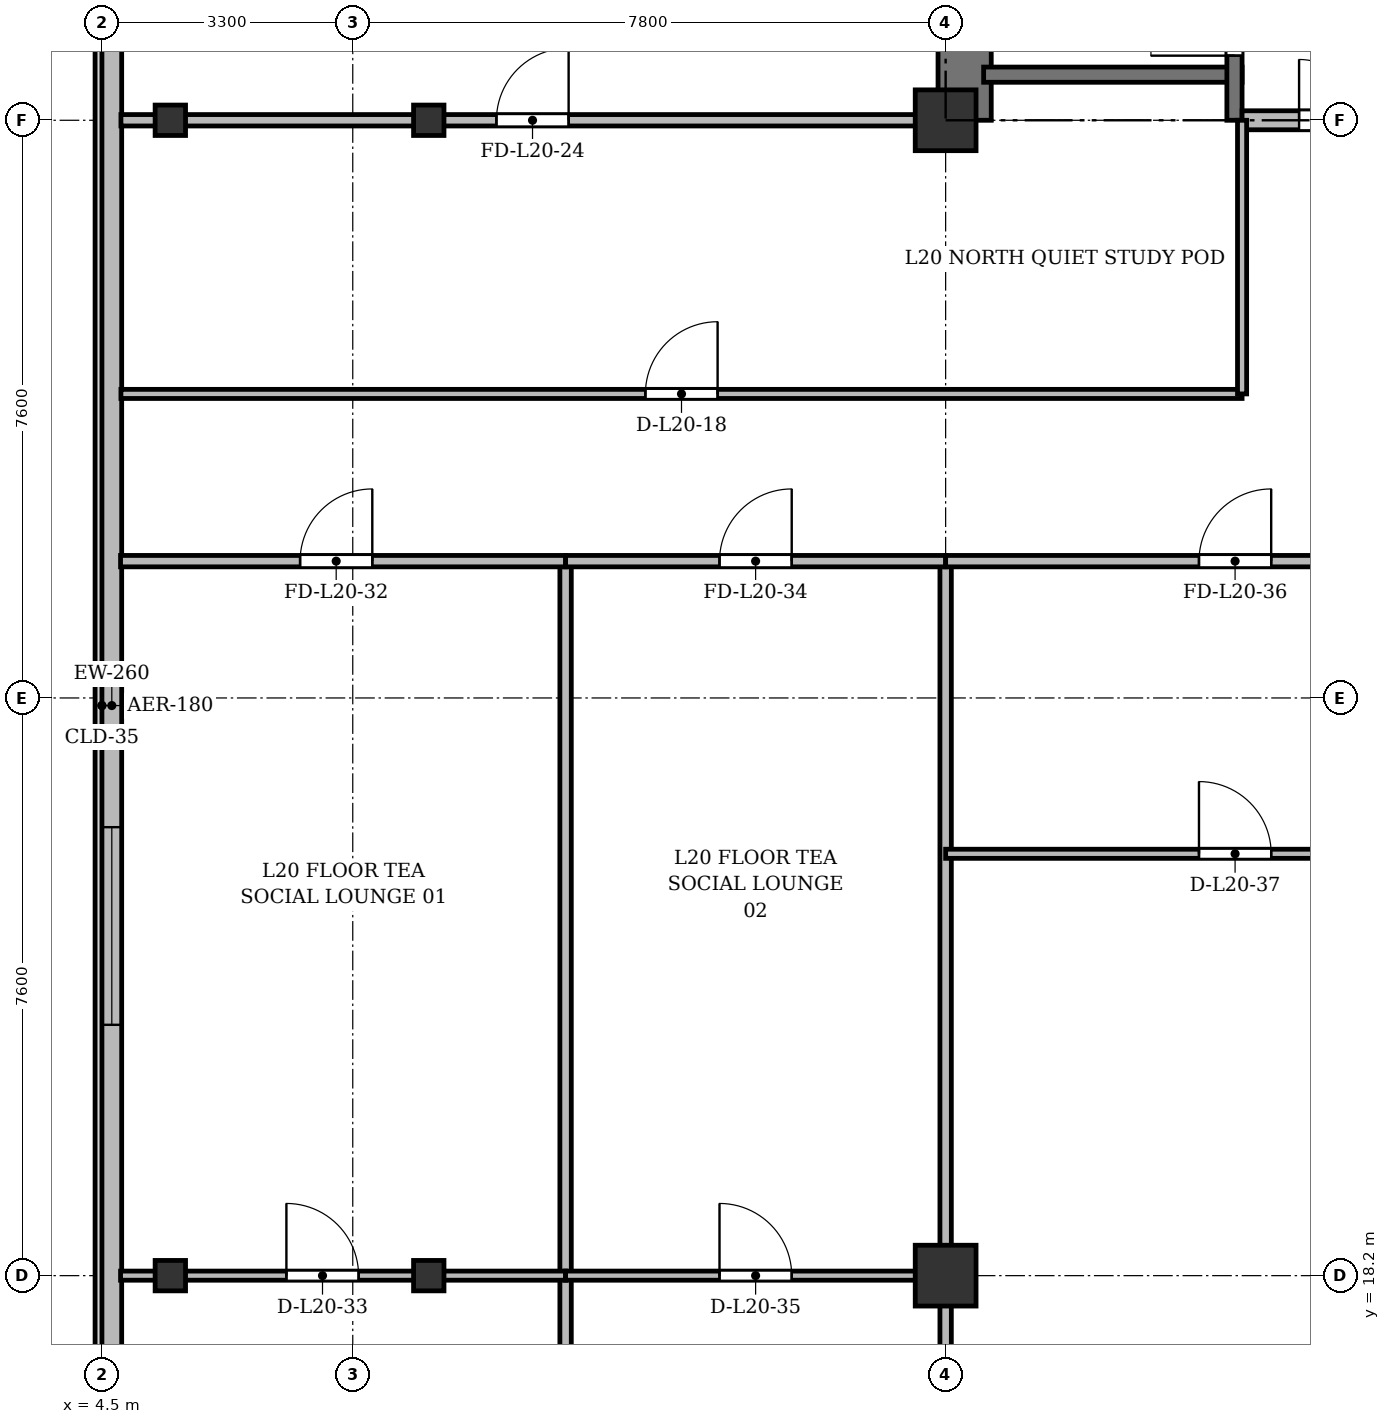
"""IFC4 building model, lengths in metres.
Left out: names, types, materials, properties, quantities, classifications, styles, units other than length and angle.
Written with IfcOpenShell. Run it as: python <this file> out.ifc"""

import sys

from ifc_helpers import new_model, si_unit, direction, frame, frame_2d, origin, origin_2d, place, context, subcontext, project, spatial, rectangle, i_section, extrude, source, transform, mapped, element, fill, save


model = new_model("IFC4")
c1 = context("Model", 3, precision=1e-05, world=origin(), true_north=direction((0.0, 1.0)))
c2 = subcontext(c1, "Body", "Model", "MODEL_VIEW")
j1 = project(units=[si_unit("LENGTHUNIT", "METRE"), si_unit("PLANEANGLEUNIT", "RADIAN")], contexts=[c1])
p1 = place(None, origin())
s1 = spatial("IfcSite", under=j1, at=p1, CompositionType="ELEMENT")
p2 = place(p1, origin())
s2 = spatial("IfcBuilding", under=s1, at=p2, CompositionType="ELEMENT")
p3 = place(p2, frame((0.0, 0.0, 81.7)))
s3 = spatial("IfcBuildingStorey", under=s2, at=p3, CompositionType="ELEMENT", Elevation=81.7)
m1 = source(origin(), c2, "Body", "SweptSolid", [
    extrude(i_section(OverallWidth=0.4, OverallDepth=0.4, WebThickness=0.022, FlangeThickness=0.035, at=origin_2d()), origin(), (0.0, 0.0, 1.0), 3.6),
])
for number, where, z_axis, x_axis in (
    (1, (5.4, 18.2, 0.0), (0.0, 0.0, 1.0), (1.0, 0.0, 0.0)),
    (2, (5.4, 33.4, 0.0), (0.0, 0.0, 1.0), (1.0, 0.0, 0.0)),
    (3, (8.8, 18.2, 0.0), (0.0, 0.0, 1.0), (1.0, 0.0, 0.0)),
    (4, (8.8, 33.4, 0.0), (0.0, 0.0, 1.0), (1.0, 0.0, 0.0)),
):
    element("IfcColumn", number, at=place(p3, frame(where, z_axis=z_axis, x_axis=x_axis)), inside=s3, PredefinedType="COLUMN", context=c2, shape_type="MappedRepresentation", body=[
        mapped(m1, transform((0.0, 0.0, 0.0), x_axis=(1.0, 0.0, 0.0), y_axis=(0.0, 1.0, 0.0), z_axis=(0.0, 0.0, 1.0), scale=1.0)),
    ])
m2 = source(origin(), c2, "Body", "SweptSolid", [
    extrude(rectangle(XDim=0.8, YDim=0.8, at=origin_2d()), origin(), (0.0, 0.0, 1.0), 3.6),
])
for number, where, z_axis, x_axis in (
    (5, (15.6, 18.2, 0.0), (0.0, 0.0, 1.0), (1.0, 0.0, 0.0)),
    (6, (15.6, 33.4, 0.0), (0.0, 0.0, 1.0), (1.0, 0.0, 0.0)),
):
    element("IfcColumn", number, at=place(p3, frame(where, z_axis=z_axis, x_axis=x_axis)), inside=s3, PredefinedType="COLUMN", context=c2, shape_type="MappedRepresentation", body=[
        mapped(m2, transform((0.0, 0.0, 0.0), x_axis=(1.0, 0.0, 0.0), y_axis=(0.0, 1.0, 0.0), z_axis=(0.0, 0.0, 1.0), scale=1.0)),
    ])
p4 = place(p3, frame((4.63, 5.9, 0.0), z_axis=(0.0, 0.0, 1.0), x_axis=(0.0, 1.0, 0.0)))
e7 = element("IfcWall", 7, at=p4, inside=s3, PredefinedType="SOLIDWALL", context=c2, shape_type="SweptSolid", body=[
    extrude(rectangle(XDim=39.6, YDim=0.26, at=frame_2d((19.8, 0.0))), origin(), (0.0, 0.0, 1.0), 3.34),
])
p5 = place(p4, frame((1.45, 0.0, 0.92)))
e8 = element("IfcOpeningElement", 8, at=p5, cuts=e7, PredefinedType="OPENING", context=c2, shape_type="SweptSolid", body=[
    extrude(rectangle(XDim=1.2, YDim=1.65, at=frame_2d((0.6, 0.825))), frame((0.0, 0.14, 0.0), z_axis=(0.0, -1.0, 0.0), x_axis=(1.0, 0.0, 0.0)), (0.0, 0.0, 1.0), 0.28),
])
p6 = place(p4, frame((4.2, 0.0, 0.92)))
e9 = element("IfcOpeningElement", 9, at=p6, cuts=e7, PredefinedType="OPENING", context=c2, shape_type="SweptSolid", body=[
    extrude(rectangle(XDim=2.6, YDim=1.9, at=frame_2d((1.3, 0.95))), frame((0.0, 0.14, 0.0), z_axis=(0.0, -1.0, 0.0), x_axis=(1.0, 0.0, 0.0)), (0.0, 0.0, 1.0), 0.28),
])
p7 = place(p4, frame((8.4, 0.0, 0.92)))
e10 = element("IfcOpeningElement", 10, at=p7, cuts=e7, PredefinedType="OPENING", context=c2, shape_type="SweptSolid", body=[
    extrude(rectangle(XDim=2.6, YDim=1.9, at=frame_2d((1.3, 0.95))), frame((0.0, 0.14, 0.0), z_axis=(0.0, -1.0, 0.0), x_axis=(1.0, 0.0, 0.0)), (0.0, 0.0, 1.0), 0.28),
])
p8 = place(p4, frame((15.6, 0.0, 0.92)))
e11 = element("IfcOpeningElement", 11, at=p8, cuts=e7, PredefinedType="OPENING", context=c2, shape_type="SweptSolid", body=[
    extrude(rectangle(XDim=2.6, YDim=1.9, at=frame_2d((1.3, 0.95))), frame((0.0, 0.14, 0.0), z_axis=(0.0, -1.0, 0.0), x_axis=(1.0, 0.0, 0.0)), (0.0, 0.0, 1.0), 0.28),
])
p9 = place(p4, frame((29.6, 0.0, 0.92)))
e12 = element("IfcOpeningElement", 12, at=p9, cuts=e7, PredefinedType="OPENING", context=c2, shape_type="SweptSolid", body=[
    extrude(rectangle(XDim=2.6, YDim=1.9, at=frame_2d((1.3, 0.95))), frame((0.0, 0.14, 0.0), z_axis=(0.0, -1.0, 0.0), x_axis=(1.0, 0.0, 0.0)), (0.0, 0.0, 1.0), 0.28),
])
p10 = place(p4, frame((37.25, 0.0, 0.92)))
e13 = element("IfcOpeningElement", 13, at=p10, cuts=e7, PredefinedType="OPENING", context=c2, shape_type="SweptSolid", body=[
    extrude(rectangle(XDim=1.2, YDim=1.65, at=frame_2d((0.6, 0.825))), frame((0.0, 0.14, 0.0), z_axis=(0.0, -1.0, 0.0), x_axis=(1.0, 0.0, 0.0)), (0.0, 0.0, 1.0), 0.28),
])
p11 = place(p3, frame((15.85, 33.4, 0.0), z_axis=(0.0, 0.0, 1.0), x_axis=(0.0, 1.0, 0.0)))
e14 = element("IfcWall", 14, at=p11, inside=s3, PredefinedType="SHEAR", context=c2, shape_type="SweptSolid", body=[
    extrude(rectangle(XDim=11.7, YDim=0.7, at=frame_2d((5.85, 0.0))), origin(), (0.0, 0.0, 1.0), 3.34),
])
p12 = place(p3, frame((16.1, 34.0, 0.0), z_axis=(0.0, 0.0, 1.0), x_axis=(1.0, 0.0, 0.0)))
e15 = element("IfcWall", 15, at=p12, inside=s3, PredefinedType="SHEAR", context=c2, shape_type="SweptSolid", body=[
    extrude(rectangle(XDim=3.4, YDim=0.2, at=frame_2d((1.7, 0.0))), origin(), (0.0, 0.0, 1.0), 3.34),
])
p13 = place(p3, frame((19.4, 33.4, 0.0), z_axis=(0.0, 0.0, 1.0), x_axis=(0.0, 1.0, 0.0)))
e16 = element("IfcWall", 16, at=p13, inside=s3, PredefinedType="SHEAR", context=c2, shape_type="SweptSolid", body=[
    extrude(rectangle(XDim=11.1, YDim=0.2, at=frame_2d((5.55, 0.0))), origin(), (0.0, 0.0, 1.0), 3.34),
])
p14 = place(p13, frame((0.85, 0.0, 0.0)))
e17 = element("IfcOpeningElement", 17, at=p14, cuts=e16, PredefinedType="OPENING", context=c2, shape_type="SweptSolid", body=[
    extrude(rectangle(XDim=1.1, YDim=2.15, at=frame_2d((0.55, 1.075))), frame((0.0, 0.11, 0.0), z_axis=(0.0, -1.0, 0.0), x_axis=(1.0, 0.0, 0.0)), (0.0, 0.0, 1.0), 0.22),
])
p15 = place(p3, frame((19.5, 33.4, 0.0), z_axis=(0.0, 0.0, 1.0), x_axis=(1.0, 0.0, 0.0)))
e18 = element("IfcWall", 18, at=p15, inside=s3, PredefinedType="PARTITIONING", context=c2, shape_type="SweptSolid", body=[
    extrude(rectangle(XDim=6.8, YDim=0.25, at=frame_2d((3.4, 0.0))), origin(), (0.0, 0.0, 1.0), 2.752),
])
p16 = place(p15, frame((0.75, 0.0, 0.0)))
e19 = element("IfcOpeningElement", 19, at=p16, cuts=e18, PredefinedType="OPENING", context=c2, shape_type="SweptSolid", body=[
    extrude(rectangle(XDim=1.6, YDim=2.2, at=frame_2d((0.8, 1.1))), frame((0.0, 0.135, 0.0), z_axis=(0.0, -1.0, 0.0), x_axis=(1.0, 0.0, 0.0)), (0.0, 0.0, 1.0), 0.27),
])
p17 = place(p3, frame((4.75, 29.8, 0.0), z_axis=(0.0, 0.0, 1.0), x_axis=(1.0, 0.0, 0.0)))
e20 = element("IfcWall", 20, at=p17, inside=s3, PredefinedType="PARTITIONING", context=c2, shape_type="SweptSolid", body=[
    extrude(rectangle(XDim=14.75, YDim=0.12, at=frame_2d((7.375, 0.0))), origin(), (0.0, 0.0, 1.0), 2.84),
])
p18 = place(p17, frame((6.9, 0.0, 0.0)))
e21 = element("IfcOpeningElement", 21, at=p18, cuts=e20, PredefinedType="OPENING", context=c2, shape_type="SweptSolid", body=[
    extrude(rectangle(XDim=0.95, YDim=2.15, at=frame_2d((0.475, 1.075))), frame((0.0, 0.07, 0.0), z_axis=(0.0, -1.0, 0.0), x_axis=(1.0, 0.0, 0.0)), (0.0, 0.0, 1.0), 0.14),
])
p19 = place(p3, frame((19.5, 29.8, 0.0), z_axis=(0.0, 0.0, 1.0), x_axis=(0.0, 1.0, 0.0)))
e22 = element("IfcWall", 22, at=p19, inside=s3, PredefinedType="PARTITIONING", context=c2, shape_type="SweptSolid", body=[
    extrude(rectangle(XDim=3.6, YDim=0.12, at=frame_2d((1.8, 0.0))), origin(), (0.0, 0.0, 1.0), 2.752),
])
p20 = place(p3, frame((4.75, 33.4, 0.0), z_axis=(0.0, 0.0, 1.0), x_axis=(1.0, 0.0, 0.0)))
e23 = element("IfcWall", 23, at=p20, inside=s3, PredefinedType="PARTITIONING", context=c2, shape_type="SweptSolid", body=[
    extrude(rectangle(XDim=10.85, YDim=0.15, at=frame_2d((5.425, 0.0))), origin(), (0.0, 0.0, 1.0), 2.752),
])
p21 = place(p20, frame((4.94, 0.0, 0.0)))
e24 = element("IfcOpeningElement", 24, at=p21, cuts=e23, PredefinedType="OPENING", context=c2, shape_type="SweptSolid", body=[
    extrude(rectangle(XDim=0.95, YDim=2.15, at=frame_2d((0.475, 1.075))), frame((0.0, 0.085, 0.0), z_axis=(0.0, -1.0, 0.0), x_axis=(1.0, 0.0, 0.0)), (0.0, 0.0, 1.0), 0.17),
])
p22 = place(p3, frame((10.6, 3.145, 0.0), z_axis=(0.0, 0.0, 1.0), x_axis=(0.0, 1.0, 0.0)))
e25 = element("IfcWall", 25, at=p22, inside=s3, PredefinedType="PARTITIONING", context=c2, shape_type="SweptSolid", body=[
    extrude(rectangle(XDim=24.455, YDim=0.15, at=frame_2d((12.228, 0.0))), origin(), (0.0, 0.0, 1.0), 2.752),
])
p23 = place(p3, frame((15.6, 3.145, 0.0), z_axis=(0.0, 0.0, 1.0), x_axis=(0.0, 1.0, 0.0)))
e26 = element("IfcWall", 26, at=p23, inside=s3, PredefinedType="PARTITIONING", context=c2, shape_type="SweptSolid", body=[
    extrude(rectangle(XDim=24.455, YDim=0.15, at=frame_2d((12.228, 0.0))), origin(), (0.0, 0.0, 1.0), 2.84),
])
p24 = place(p3, frame((4.745, 27.6, 0.0), z_axis=(0.0, 0.0, 1.0), x_axis=(1.0, 0.0, 0.0)))
e27 = element("IfcWall", 27, at=p24, inside=s3, PredefinedType="PARTITIONING", context=c2, shape_type="SweptSolid", body=[
    extrude(rectangle(XDim=5.855, YDim=0.15, at=frame_2d((2.927, 0.0))), origin(), (0.0, 0.0, 1.0), 2.84),
])
p25 = place(p24, frame((2.362, 0.0, 0.0)))
e28 = element("IfcOpeningElement", 28, at=p25, cuts=e27, PredefinedType="OPENING", context=c2, shape_type="SweptSolid", body=[
    extrude(rectangle(XDim=0.95, YDim=2.15, at=frame_2d((0.475, 1.075))), frame((0.0, 0.085, 0.0), z_axis=(0.0, -1.0, 0.0), x_axis=(1.0, 0.0, 0.0)), (0.0, 0.0, 1.0), 0.17),
])
p26 = place(p3, frame((4.745, 18.2, 0.0), z_axis=(0.0, 0.0, 1.0), x_axis=(1.0, 0.0, 0.0)))
e29 = element("IfcWall", 29, at=p26, inside=s3, PredefinedType="PARTITIONING", context=c2, shape_type="SweptSolid", body=[
    extrude(rectangle(XDim=5.855, YDim=0.12, at=frame_2d((2.927, 0.0))), origin(), (0.0, 0.0, 1.0), 2.752),
])
p27 = place(p26, frame((2.182, 0.0, 0.0)))
e30 = element("IfcOpeningElement", 30, at=p27, cuts=e29, PredefinedType="OPENING", context=c2, shape_type="SweptSolid", body=[
    extrude(rectangle(XDim=0.95, YDim=2.15, at=frame_2d((0.475, 1.075))), frame((0.0, 0.07, 0.0), z_axis=(0.0, -1.0, 0.0), x_axis=(1.0, 0.0, 0.0)), (0.0, 0.0, 1.0), 0.14),
])
p28 = place(p3, frame((10.6, 27.6, 0.0), z_axis=(0.0, 0.0, 1.0), x_axis=(1.0, 0.0, 0.0)))
e31 = element("IfcWall", 31, at=p28, inside=s3, PredefinedType="PARTITIONING", context=c2, shape_type="SweptSolid", body=[
    extrude(rectangle(XDim=5.0, YDim=0.15, at=frame_2d((2.5, 0.0))), origin(), (0.0, 0.0, 1.0), 2.84),
])
p29 = place(p28, frame((2.025, 0.0, 0.0)))
e32 = element("IfcOpeningElement", 32, at=p29, cuts=e31, PredefinedType="OPENING", context=c2, shape_type="SweptSolid", body=[
    extrude(rectangle(XDim=0.95, YDim=2.15, at=frame_2d((0.475, 1.075))), frame((0.0, 0.085, 0.0), z_axis=(0.0, -1.0, 0.0), x_axis=(1.0, 0.0, 0.0)), (0.0, 0.0, 1.0), 0.17),
])
p30 = place(p3, frame((10.6, 18.2, 0.0), z_axis=(0.0, 0.0, 1.0), x_axis=(1.0, 0.0, 0.0)))
e33 = element("IfcWall", 33, at=p30, inside=s3, PredefinedType="PARTITIONING", context=c2, shape_type="SweptSolid", body=[
    extrude(rectangle(XDim=5.0, YDim=0.12, at=frame_2d((2.5, 0.0))), origin(), (0.0, 0.0, 1.0), 2.752),
])
p31 = place(p30, frame((2.025, 0.0, 0.0)))
e34 = element("IfcOpeningElement", 34, at=p31, cuts=e33, PredefinedType="OPENING", context=c2, shape_type="SweptSolid", body=[
    extrude(rectangle(XDim=0.95, YDim=2.15, at=frame_2d((0.475, 1.075))), frame((0.0, 0.07, 0.0), z_axis=(0.0, -1.0, 0.0), x_axis=(1.0, 0.0, 0.0)), (0.0, 0.0, 1.0), 0.14),
])
p32 = place(p3, frame((15.6, 27.6, 0.0), z_axis=(0.0, 0.0, 1.0), x_axis=(1.0, 0.0, 0.0)))
e35 = element("IfcWall", 35, at=p32, inside=s3, PredefinedType="PARTITIONING", context=c2, shape_type="SweptSolid", body=[
    extrude(rectangle(XDim=7.8, YDim=0.15, at=frame_2d((3.9, 0.0))), origin(), (0.0, 0.0, 1.0), 2.84),
])
p33 = place(p32, frame((3.333, 0.0, 0.0)))
e36 = element("IfcOpeningElement", 36, at=p33, cuts=e35, PredefinedType="OPENING", context=c2, shape_type="SweptSolid", body=[
    extrude(rectangle(XDim=0.95, YDim=2.15, at=frame_2d((0.475, 1.075))), frame((0.0, 0.085, 0.0), z_axis=(0.0, -1.0, 0.0), x_axis=(1.0, 0.0, 0.0)), (0.0, 0.0, 1.0), 0.17),
])
p34 = place(p3, frame((15.6, 23.75, 0.0), z_axis=(0.0, 0.0, 1.0), x_axis=(1.0, 0.0, 0.0)))
e37 = element("IfcWall", 37, at=p34, inside=s3, PredefinedType="PARTITIONING", context=c2, shape_type="SweptSolid", body=[
    extrude(rectangle(XDim=7.8, YDim=0.12, at=frame_2d((3.9, 0.0))), origin(), (0.0, 0.0, 1.0), 2.84),
])
p35 = place(p34, frame((3.333, 0.0, 0.0)))
e38 = element("IfcOpeningElement", 38, at=p35, cuts=e37, PredefinedType="OPENING", context=c2, shape_type="SweptSolid", body=[
    extrude(rectangle(XDim=0.95, YDim=2.15, at=frame_2d((0.475, 1.075))), frame((0.0, 0.07, 0.0), z_axis=(0.0, -1.0, 0.0), x_axis=(1.0, 0.0, 0.0)), (0.0, 0.0, 1.0), 0.14),
])
m3 = source(origin(), c2, "Body", "SweptSolid", [
    extrude(rectangle(XDim=2.6, YDim=1.9, at=frame_2d((1.3, 0.95))), frame((0.0, 0.03, 0.0), z_axis=(0.0, -1.0, 0.0), x_axis=(1.0, 0.0, 0.0)), (0.0, 0.0, 1.0), 0.06),
])
p36 = place(p8, origin())
e39 = element("IfcWindow", 39, at=p36, inside=s3, PartitioningType="SINGLE_PANEL", PredefinedType="WINDOW", context=c2, shape_type="MappedRepresentation", body=[
    mapped(m3, transform((0.0, 0.0, 0.0), x_axis=(1.0, 0.0, 0.0), y_axis=(0.0, 1.0, 0.0), z_axis=(0.0, 0.0, 1.0), scale=1.0)),
])
fill(e11, e39)
m4 = source(origin(), c2, "Body", "SweptSolid", [
    extrude(rectangle(XDim=1.1, YDim=2.15, at=frame_2d((0.55, 1.075))), frame((0.0, 0.025, 0.0), z_axis=(0.0, -1.0, 0.0), x_axis=(1.0, 0.0, 0.0)), (0.0, 0.0, 1.0), 0.05),
])
p37 = place(p14, origin())
e40 = element("IfcDoor", 40, at=p37, inside=s3, OperationType="SINGLE_SWING_LEFT", PredefinedType="DOOR", context=c2, shape_type="MappedRepresentation", body=[
    mapped(m4, transform((0.0, 0.0, 0.0), x_axis=(1.0, 0.0, 0.0), y_axis=(0.0, 1.0, 0.0), z_axis=(0.0, 0.0, 1.0), scale=1.0)),
])
fill(e17, e40)
m5 = source(origin(), c2, "Body", "SweptSolid", [
    extrude(rectangle(XDim=1.6, YDim=2.2, at=frame_2d((0.8, 1.1))), frame((0.0, 0.025, 0.0), z_axis=(0.0, -1.0, 0.0), x_axis=(1.0, 0.0, 0.0)), (0.0, 0.0, 1.0), 0.05),
])
p38 = place(p16, origin())
e41 = element("IfcDoor", 41, at=p38, inside=s3, OperationType="DOUBLE_DOOR_SINGLE_SWING", PredefinedType="DOOR", context=c2, shape_type="MappedRepresentation", body=[
    mapped(m5, transform((0.0, 0.0, 0.0), x_axis=(1.0, 0.0, 0.0), y_axis=(0.0, 1.0, 0.0), z_axis=(0.0, 0.0, 1.0), scale=1.0)),
])
fill(e19, e41)
m6 = source(origin(), c2, "Body", "SweptSolid", [
    extrude(rectangle(XDim=0.95, YDim=2.15, at=frame_2d((0.475, 1.075))), frame((0.0, 0.025, 0.0), z_axis=(0.0, -1.0, 0.0), x_axis=(1.0, 0.0, 0.0)), (0.0, 0.0, 1.0), 0.05),
])
p39 = place(p18, origin())
e42 = element("IfcDoor", 42, at=p39, inside=s3, OperationType="SINGLE_SWING_RIGHT", PredefinedType="DOOR", context=c2, shape_type="MappedRepresentation", body=[
    mapped(m6, transform((0.0, 0.0, 0.0), x_axis=(1.0, 0.0, 0.0), y_axis=(0.0, 1.0, 0.0), z_axis=(0.0, 0.0, 1.0), scale=1.0)),
])
fill(e21, e42)
p40 = place(p21, origin())
e43 = element("IfcDoor", 43, at=p40, inside=s3, OperationType="SINGLE_SWING_RIGHT", PredefinedType="DOOR", context=c2, shape_type="MappedRepresentation", body=[
    mapped(m6, transform((0.0, 0.0, 0.0), x_axis=(1.0, 0.0, 0.0), y_axis=(0.0, 1.0, 0.0), z_axis=(0.0, 0.0, 1.0), scale=1.0)),
])
fill(e24, e43)
p41 = place(p25, origin())
e44 = element("IfcDoor", 44, at=p41, inside=s3, OperationType="SINGLE_SWING_RIGHT", PredefinedType="DOOR", context=c2, shape_type="MappedRepresentation", body=[
    mapped(m6, transform((0.0, 0.0, 0.0), x_axis=(1.0, 0.0, 0.0), y_axis=(0.0, 1.0, 0.0), z_axis=(0.0, 0.0, 1.0), scale=1.0)),
])
fill(e28, e44)
p42 = place(p27, origin())
e45 = element("IfcDoor", 45, at=p42, inside=s3, OperationType="SINGLE_SWING_LEFT", PredefinedType="DOOR", context=c2, shape_type="MappedRepresentation", body=[
    mapped(m6, transform((0.0, 0.0, 0.0), x_axis=(1.0, 0.0, 0.0), y_axis=(0.0, 1.0, 0.0), z_axis=(0.0, 0.0, 1.0), scale=1.0)),
])
fill(e30, e45)
p43 = place(p29, origin())
e46 = element("IfcDoor", 46, at=p43, inside=s3, OperationType="SINGLE_SWING_RIGHT", PredefinedType="DOOR", context=c2, shape_type="MappedRepresentation", body=[
    mapped(m6, transform((0.0, 0.0, 0.0), x_axis=(1.0, 0.0, 0.0), y_axis=(0.0, 1.0, 0.0), z_axis=(0.0, 0.0, 1.0), scale=1.0)),
])
fill(e32, e46)
p44 = place(p31, origin())
e47 = element("IfcDoor", 47, at=p44, inside=s3, OperationType="SINGLE_SWING_LEFT", PredefinedType="DOOR", context=c2, shape_type="MappedRepresentation", body=[
    mapped(m6, transform((0.0, 0.0, 0.0), x_axis=(1.0, 0.0, 0.0), y_axis=(0.0, 1.0, 0.0), z_axis=(0.0, 0.0, 1.0), scale=1.0)),
])
fill(e34, e47)
p45 = place(p33, origin())
e48 = element("IfcDoor", 48, at=p45, inside=s3, OperationType="SINGLE_SWING_RIGHT", PredefinedType="DOOR", context=c2, shape_type="MappedRepresentation", body=[
    mapped(m6, transform((0.0, 0.0, 0.0), x_axis=(1.0, 0.0, 0.0), y_axis=(0.0, 1.0, 0.0), z_axis=(0.0, 0.0, 1.0), scale=1.0)),
])
fill(e36, e48)
p46 = place(p35, origin())
e49 = element("IfcDoor", 49, at=p46, inside=s3, OperationType="SINGLE_SWING_LEFT", PredefinedType="DOOR", context=c2, shape_type="MappedRepresentation", body=[
    mapped(m6, transform((0.0, 0.0, 0.0), x_axis=(1.0, 0.0, 0.0), y_axis=(0.0, 1.0, 0.0), z_axis=(0.0, 0.0, 1.0), scale=1.0)),
])
fill(e38, e49)
save(model, sys.argv[1])
